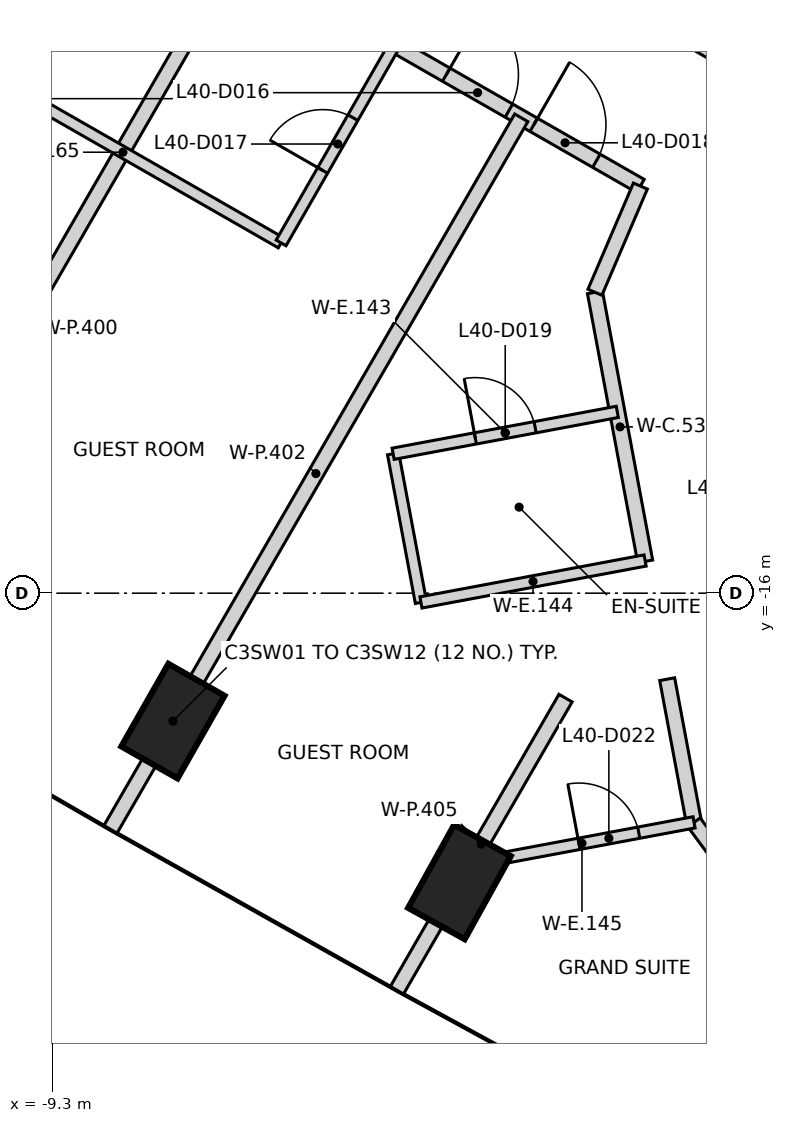
"""IFC4 building model, lengths in metres.
Left out: names, types, materials, properties, quantities, classifications, styles, units other than length and angle.
Written with IfcOpenShell. Run it as: python <this file> out.ifc"""

import sys

from ifc_helpers import new_model, si_unit, direction, frame, frame_2d, origin, origin_2d, place, context, subcontext, project, spatial, rectangle, extrude, element, fill, save


model = new_model("IFC4")
c1 = context("Model", 3, precision=1e-05, world=origin(), true_north=direction((0.0, 1.0)))
c2 = subcontext(c1, "Body", "Model", "MODEL_VIEW")
j1 = project(units=[si_unit("LENGTHUNIT", "METRE"), si_unit("PLANEANGLEUNIT", "RADIAN")], contexts=[c1])
p1 = place(None, origin())
s1 = spatial("IfcSite", under=j1, at=p1, CompositionType="ELEMENT")
p2 = place(p1, origin())
s2 = spatial("IfcBuilding", under=s1, at=p2, CompositionType="ELEMENT")
p3 = place(p2, frame((0.0, 0.0, 161.2)))
s3 = spatial("IfcBuildingStorey", under=s2, at=p3, CompositionType="ELEMENT", Elevation=161.2)
for number, where, z_axis, x_axis in (
    (1, (-7.714, -17.683, -0.4), (0.0, 0.0, 1.0), (0.495, 0.869, 0.0)),
    (2, (-3.945, -19.8, -0.4), (0.0, 0.0, 1.0), (0.485, 0.875, 0.0)),
    (3, (-0.151, -21.871, -0.4), (0.0, 0.0, 1.0), (0.474, 0.881, 0.0)),
):
    element("IfcColumn", number, at=place(p3, frame(where, z_axis=z_axis, x_axis=x_axis)), inside=s3, PredefinedType="COLUMN", context=c2, shape_type="SweptSolid", body=[
        extrude(rectangle(XDim=1.25, YDim=0.85, at=origin_2d()), origin(), (0.0, 0.0, 1.0), 2.884),
    ])
p4 = place(p3, frame((-10.642, -5.44, 0.0), z_axis=(0.0, 0.0, 1.0), x_axis=(0.867610688994, -0.497244097344, 0.0)))
e4 = element("IfcWall", 4, at=p4, inside=s3, PredefinedType="PARTITIONING", context=c2, shape_type="SweptSolid", body=[
    extrude(rectangle(XDim=10.464, YDim=0.2, at=frame_2d((5.232, 0.0))), origin(), (0.0, 0.0, 1.0), 3.2),
])
p5 = place(p4, frame((0.2, 0.0, 0.0)))
e5 = element("IfcOpeningElement", 5, at=p5, cuts=e4, PredefinedType="OPENING", context=c2, shape_type="SweptSolid", body=[
    extrude(rectangle(XDim=0.95, YDim=2.1, at=frame_2d((0.475, 1.05))), frame((0.0, 0.11, 0.0), z_axis=(0.0, -1.0, 0.0), x_axis=(1.0, 0.0, 0.0)), (0.0, 0.0, 1.0), 0.22),
])
p6 = place(p4, frame((7.519, 0.0, 0.0)))
e6 = element("IfcOpeningElement", 6, at=p6, cuts=e4, PredefinedType="OPENING", context=c2, shape_type="SweptSolid", body=[
    extrude(rectangle(XDim=0.95, YDim=2.1, at=frame_2d((0.475, 1.05))), frame((0.0, 0.11, 0.0), z_axis=(0.0, -1.0, 0.0), x_axis=(1.0, 0.0, 0.0)), (0.0, 0.0, 1.0), 0.22),
])
p7 = place(p4, frame((8.846, 0.0, 0.0)))
e7 = element("IfcOpeningElement", 7, at=p7, cuts=e4, PredefinedType="OPENING", context=c2, shape_type="SweptSolid", body=[
    extrude(rectangle(XDim=0.95, YDim=2.1, at=frame_2d((0.475, 1.05))), frame((0.0, 0.11, 0.0), z_axis=(0.0, -1.0, 0.0), x_axis=(1.0, 0.0, 0.0)), (0.0, 0.0, 1.0), 0.22),
])
p8 = place(p3, frame((-8.612, -4.265, 0.0), z_axis=(0.0, 0.0, 1.0), x_axis=(0.865984415152, -0.500070987675, 0.0)))
e8 = element("IfcWall", 8, at=p8, inside=s3, PredefinedType="PARTITIONING", context=c2, shape_type="SweptSolid", body=[
    extrude(rectangle(XDim=10.651, YDim=0.2, at=frame_2d((5.326, 0.0))), origin(), (0.0, 0.0, 1.0), 3.2),
])
p9 = place(p8, frame((1.138, 0.0, 0.0)))
e9 = element("IfcOpeningElement", 9, at=p9, cuts=e8, PredefinedType="OPENING", context=c2, shape_type="SweptSolid", body=[
    extrude(rectangle(XDim=0.9, YDim=2.1, at=frame_2d((0.45, 1.05))), frame((0.0, 0.11, 0.0), z_axis=(0.0, -1.0, 0.0), x_axis=(1.0, 0.0, 0.0)), (0.0, 0.0, 1.0), 0.22),
])
p10 = place(p8, frame((4.876, 0.0, 0.0)))
e10 = element("IfcOpeningElement", 10, at=p10, cuts=e8, PredefinedType="OPENING", context=c2, shape_type="SweptSolid", body=[
    extrude(rectangle(XDim=0.9, YDim=2.1, at=frame_2d((0.45, 1.05))), frame((0.0, 0.11, 0.0), z_axis=(0.0, -1.0, 0.0), x_axis=(1.0, 0.0, 0.0)), (0.0, 0.0, 1.0), 0.22),
])
p11 = place(p8, frame((8.613, 0.0, 0.0)))
e11 = element("IfcOpeningElement", 11, at=p11, cuts=e8, PredefinedType="OPENING", context=c2, shape_type="SweptSolid", body=[
    extrude(rectangle(XDim=0.9, YDim=2.1, at=frame_2d((0.45, 1.05))), frame((0.0, 0.11, 0.0), z_axis=(0.0, -1.0, 0.0), x_axis=(1.0, 0.0, 0.0)), (0.0, 0.0, 1.0), 0.22),
])
p12 = place(p3, frame((-2.162, -12.042, 0.0), z_axis=(0.0, 0.0, 1.0), x_axis=(0.183572226488, -0.983006224631, 0.0)))
e12 = element("IfcWall", 12, at=p12, inside=s3, PredefinedType="PARTITIONING", context=c2, shape_type="SweptSolid", body=[
    extrude(rectangle(XDim=3.602, YDim=0.2, at=frame_2d((1.801, 0.0))), origin(), (0.0, 0.0, 1.0), 3.2),
])
p13 = place(p3, frame((-2.162, -12.041, 0.0), z_axis=(0.0, 0.0, 1.0), x_axis=(0.393609042413, 0.919277934974, 0.0)))
e13 = element("IfcWall", 13, at=p13, inside=s3, PredefinedType="PARTITIONING", context=c2, shape_type="SweptSolid", body=[
    extrude(rectangle(XDim=1.52, YDim=0.2, at=frame_2d((0.76, 0.0))), origin(), (0.0, 0.0, 1.0), 3.2),
])
p14 = place(p3, frame((-1.212, -17.131, 0.0), z_axis=(0.0, 0.0, 1.0), x_axis=(0.183680924698, -0.982985919483, 0.0)))
e14 = element("IfcWall", 14, at=p14, inside=s3, PredefinedType="PARTITIONING", context=c2, shape_type="SweptSolid", body=[
    extrude(rectangle(XDim=1.917, YDim=0.2, at=frame_2d((0.958, 0.0))), origin(), (0.0, 0.0, 1.0), 3.2),
])
p15 = place(p3, frame((-0.858, -19.016, 0.0), z_axis=(0.0, 0.0, 1.0), x_axis=(0.593123867414, -0.805111220829, 0.0)))
e15 = element("IfcWall", 15, at=p15, inside=s3, PredefinedType="PARTITIONING", context=c2, shape_type="SweptSolid", body=[
    extrude(rectangle(XDim=2.77, YDim=0.2, at=frame_2d((1.385, 0.0))), origin(), (0.0, 0.0, 1.0), 3.2),
])
p16 = place(p15, frame((0.555, 0.0, 0.0)))
e16 = element("IfcOpeningElement", 16, at=p16, cuts=e15, PredefinedType="OPENING", context=c2, shape_type="SweptSolid", body=[
    extrude(rectangle(XDim=0.95, YDim=2.1, at=frame_2d((0.475, 1.05))), frame((0.0, 0.11, 0.0), z_axis=(0.0, -1.0, 0.0), x_axis=(1.0, 0.0, 0.0)), (0.0, 0.0, 1.0), 0.22),
])
p17 = place(p3, frame((-12.278, -16.946, 0.0), z_axis=(0.0, 0.0, 1.0), x_axis=(0.499882324153, 0.866093333307, 0.0)))
e17 = element("IfcWall", 17, at=p17, inside=s3, PredefinedType="PARTITIONING", context=c2, shape_type="SweptSolid", body=[
    extrude(rectangle(XDim=10.796, YDim=0.2, at=frame_2d((5.398, 0.0))), origin(), (0.0, 0.0, 1.0), 3.2),
])
p18 = place(p3, frame((-8.535, -19.107, 0.0), z_axis=(0.0, 0.0, 1.0), x_axis=(0.499987057201, 0.866032876184, 0.0)))
e18 = element("IfcWall", 18, at=p18, inside=s3, PredefinedType="PARTITIONING", context=c2, shape_type="SweptSolid", body=[
    extrude(rectangle(XDim=10.809, YDim=0.2, at=frame_2d((5.404, 0.0))), origin(), (0.0, 0.0, 1.0), 3.2),
])
p19 = place(p3, frame((-4.767, -21.223, 0.0), z_axis=(0.0, 0.0, 1.0), x_axis=(0.49992092869, 0.866071050814, 0.0)))
e19 = element("IfcWall", 19, at=p19, inside=s3, PredefinedType="PARTITIONING", context=c2, shape_type="SweptSolid", body=[
    extrude(rectangle(XDim=4.437, YDim=0.2, at=frame_2d((2.218, 0.0))), origin(), (0.0, 0.0, 1.0), 3.2),
])
p20 = place(p3, frame((-10.454, -9.003, 0.0), z_axis=(0.0, 0.0, 1.0), x_axis=(0.49740127306, 0.867520589703, 0.0)))
e20 = element("IfcWall", 20, at=p20, inside=s3, PredefinedType="PARTITIONING", context=c2, shape_type="SweptSolid", body=[
    extrude(rectangle(XDim=2.998, YDim=0.15, at=frame_2d((1.499, 0.0))), origin(), (0.0, 0.0, 1.0), 3.2),
])
p21 = place(p20, frame((1.098, 0.0, 0.0)))
e21 = element("IfcOpeningElement", 21, at=p21, cuts=e20, PredefinedType="OPENING", context=c2, shape_type="SweptSolid", body=[
    extrude(rectangle(XDim=0.8, YDim=2.1, at=frame_2d((0.4, 1.05))), frame((0.0, 0.085, 0.0), z_axis=(0.0, -1.0, 0.0), x_axis=(1.0, 0.0, 0.0)), (0.0, 0.0, 1.0), 0.17),
])
p22 = place(p3, frame((-10.453, -9.006, 0.0), z_axis=(0.0, 0.0, 1.0), x_axis=(0.86760039778, -0.49726205342, 0.0)))
e22 = element("IfcWall", 22, at=p22, inside=s3, PredefinedType="PARTITIONING", context=c2, shape_type="SweptSolid", body=[
    extrude(rectangle(XDim=4.797, YDim=0.15, at=frame_2d((2.399, 0.0))), origin(), (0.0, 0.0, 1.0), 3.2),
])
p23 = place(p3, frame((-6.291, -11.392, 0.0), z_axis=(0.0, 0.0, 1.0), x_axis=(0.497409432693, 0.867515911248, 0.0)))
e23 = element("IfcWall", 23, at=p23, inside=s3, PredefinedType="PARTITIONING", context=c2, shape_type="SweptSolid", body=[
    extrude(rectangle(XDim=3.0, YDim=0.15, at=frame_2d((1.5, 0.0))), origin(), (0.0, 0.0, 1.0), 3.2),
])
p24 = place(p23, frame((1.1, 0.0, 0.0)))
e24 = element("IfcOpeningElement", 24, at=p24, cuts=e23, PredefinedType="OPENING", context=c2, shape_type="SweptSolid", body=[
    extrude(rectangle(XDim=0.8, YDim=2.1, at=frame_2d((0.4, 1.05))), frame((0.0, 0.085, 0.0), z_axis=(0.0, -1.0, 0.0), x_axis=(1.0, 0.0, 0.0)), (0.0, 0.0, 1.0), 0.17),
])
p25 = place(p3, frame((-4.817, -14.166, 0.0), z_axis=(0.0, 0.0, 1.0), x_axis=(0.183903339385, -0.982944332993, 0.0)))
e25 = element("IfcWall", 25, at=p25, inside=s3, PredefinedType="PARTITIONING", context=c2, shape_type="SweptSolid", body=[
    extrude(rectangle(XDim=1.99, YDim=0.15, at=frame_2d((0.995, 0.0))), origin(), (0.0, 0.0, 1.0), 3.2),
])
p26 = place(p3, frame((-4.817, -14.166, 0.0), z_axis=(0.0, 0.0, 1.0), x_axis=(0.982987155193, 0.183674311555, 0.0)))
e26 = element("IfcWall", 26, at=p26, inside=s3, PredefinedType="PARTITIONING", context=c2, shape_type="SweptSolid", body=[
    extrude(rectangle(XDim=3.0, YDim=0.15, at=frame_2d((1.5, 0.0))), origin(), (0.0, 0.0, 1.0), 3.2),
])
p27 = place(p26, frame((1.1, 0.0, 0.0)))
e27 = element("IfcOpeningElement", 27, at=p27, cuts=e26, PredefinedType="OPENING", context=c2, shape_type="SweptSolid", body=[
    extrude(rectangle(XDim=0.8, YDim=2.1, at=frame_2d((0.4, 1.05))), frame((0.0, 0.085, 0.0), z_axis=(0.0, -1.0, 0.0), x_axis=(1.0, 0.0, 0.0)), (0.0, 0.0, 1.0), 0.17),
])
p28 = place(p3, frame((-4.451, -16.122, 0.0), z_axis=(0.0, 0.0, 1.0), x_axis=(0.982928336035, 0.18398882091, 0.0)))
e28 = element("IfcWall", 28, at=p28, inside=s3, PredefinedType="PARTITIONING", context=c2, shape_type="SweptSolid", body=[
    extrude(rectangle(XDim=3.0, YDim=0.15, at=frame_2d((1.5, 0.0))), origin(), (0.0, 0.0, 1.0), 3.2),
])
p29 = place(p3, frame((-3.807, -19.566, 0.0), z_axis=(0.0, 0.0, 1.0), x_axis=(0.982987155193, 0.183674311555, 0.0)))
e29 = element("IfcWall", 29, at=p29, inside=s3, PredefinedType="PARTITIONING", context=c2, shape_type="SweptSolid", body=[
    extrude(rectangle(XDim=3.0, YDim=0.15, at=frame_2d((1.5, 0.0))), origin(), (0.0, 0.0, 1.0), 3.2),
])
p30 = place(p29, frame((1.46, 0.0, 0.0)))
e30 = element("IfcOpeningElement", 30, at=p30, cuts=e29, PredefinedType="OPENING", context=c2, shape_type="SweptSolid", body=[
    extrude(rectangle(XDim=0.8, YDim=2.1, at=frame_2d((0.4, 1.05))), frame((0.0, 0.085, 0.0), z_axis=(0.0, -1.0, 0.0), x_axis=(1.0, 0.0, 0.0)), (0.0, 0.0, 1.0), 0.17),
])
p31 = place(p6, frame((0.95, 0.0, 0.0), z_axis=(0.0, 0.0, 1.0), x_axis=(-1.0, 0.0, 0.0)))
e31 = element("IfcDoor", 31, at=p31, inside=s3, OperationType="SINGLE_SWING_LEFT", PredefinedType="DOOR", context=c2, shape_type="SweptSolid", body=[
    extrude(rectangle(XDim=0.95, YDim=2.1, at=frame_2d((0.475, 1.05))), frame((0.0, 0.025, 0.0), z_axis=(0.0, -1.0, 0.0), x_axis=(1.0, 0.0, 0.0)), (0.0, 0.0, 1.0), 0.05),
])
fill(e6, e31)
p32 = place(p24, origin())
e32 = element("IfcDoor", 32, at=p32, inside=s3, OperationType="SINGLE_SWING_LEFT", PredefinedType="DOOR", context=c2, shape_type="SweptSolid", body=[
    extrude(rectangle(XDim=0.8, YDim=2.1, at=frame_2d((0.4, 1.05))), frame((0.0, 0.025, 0.0), z_axis=(0.0, -1.0, 0.0), x_axis=(1.0, 0.0, 0.0)), (0.0, 0.0, 1.0), 0.05),
])
fill(e24, e32)
p33 = place(p7, frame((0.95, 0.0, 0.0), z_axis=(0.0, 0.0, 1.0), x_axis=(-1.0, 0.0, 0.0)))
e33 = element("IfcDoor", 33, at=p33, inside=s3, OperationType="SINGLE_SWING_LEFT", PredefinedType="DOOR", context=c2, shape_type="SweptSolid", body=[
    extrude(rectangle(XDim=0.95, YDim=2.1, at=frame_2d((0.475, 1.05))), frame((0.0, 0.025, 0.0), z_axis=(0.0, -1.0, 0.0), x_axis=(1.0, 0.0, 0.0)), (0.0, 0.0, 1.0), 0.05),
])
fill(e7, e33)
p34 = place(p27, frame((0.8, 0.0, 0.0), z_axis=(0.0, 0.0, 1.0), x_axis=(-1.0, 0.0, 0.0)))
e34 = element("IfcDoor", 34, at=p34, inside=s3, OperationType="SINGLE_SWING_LEFT", PredefinedType="DOOR", context=c2, shape_type="SweptSolid", body=[
    extrude(rectangle(XDim=0.8, YDim=2.1, at=frame_2d((0.4, 1.05))), frame((0.0, 0.025, 0.0), z_axis=(0.0, -1.0, 0.0), x_axis=(1.0, 0.0, 0.0)), (0.0, 0.0, 1.0), 0.05),
])
fill(e27, e34)
p35 = place(p30, frame((0.8, 0.0, 0.0), z_axis=(0.0, 0.0, 1.0), x_axis=(-1.0, 0.0, 0.0)))
e35 = element("IfcDoor", 35, at=p35, inside=s3, OperationType="SINGLE_SWING_LEFT", PredefinedType="DOOR", context=c2, shape_type="SweptSolid", body=[
    extrude(rectangle(XDim=0.8, YDim=2.1, at=frame_2d((0.4, 1.05))), frame((0.0, 0.025, 0.0), z_axis=(0.0, -1.0, 0.0), x_axis=(1.0, 0.0, 0.0)), (0.0, 0.0, 1.0), 0.05),
])
fill(e30, e35)
p36 = place(p11, origin())
e36 = element("IfcDoor", 36, at=p36, inside=s3, OperationType="SINGLE_SWING_LEFT", PredefinedType="DOOR", context=c2, shape_type="SweptSolid", body=[
    extrude(rectangle(XDim=0.9, YDim=2.1, at=frame_2d((0.45, 1.05))), frame((0.0, 0.025, 0.0), z_axis=(0.0, -1.0, 0.0), x_axis=(1.0, 0.0, 0.0)), (0.0, 0.0, 1.0), 0.05),
])
fill(e11, e36)
save(model, sys.argv[1])
